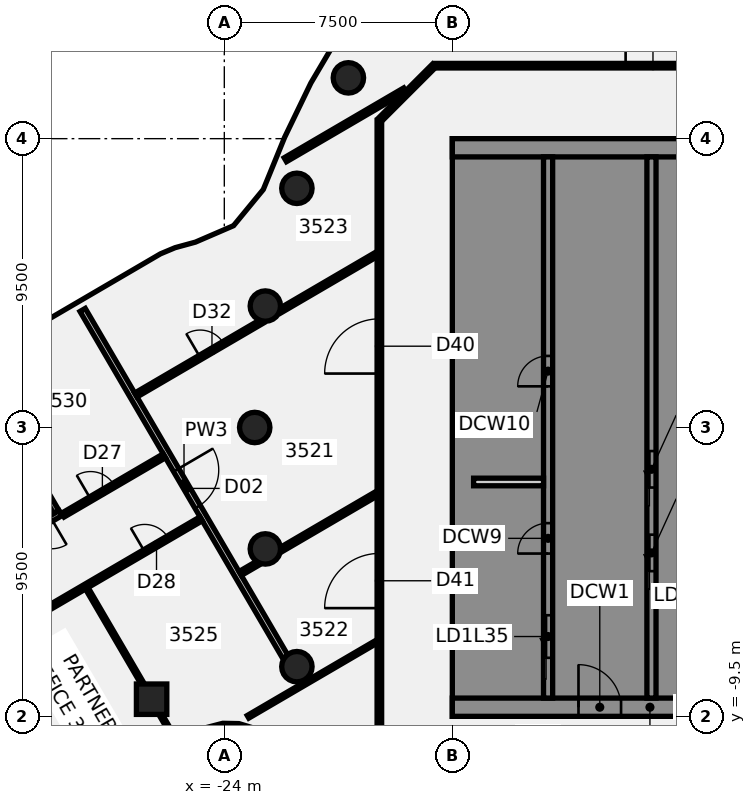
"""IFC4 building model, lengths in metres.
Left out: names, types, materials, properties, quantities, classifications, styles, units other than length and angle.
Written with IfcOpenShell. Run it as: python <this file> out.ifc"""

import sys

from ifc_helpers import new_model, si_unit, direction, frame, frame_2d, origin, origin_2d, place, context, subcontext, project, spatial, polyline, rectangle, circle, outline, extrude, element, fill, save


model = new_model("IFC4")
c1 = context("Model", 3, precision=1e-05, world=origin(), true_north=direction((0.0, 1.0)))
c2 = subcontext(c1, "Body", "Model", "MODEL_VIEW")
j1 = project(units=[si_unit("LENGTHUNIT", "METRE"), si_unit("PLANEANGLEUNIT", "RADIAN")], contexts=[c1])
p1 = place(None, origin())
s1 = spatial("IfcSite", under=j1, at=p1, CompositionType="ELEMENT")
p2 = place(p1, origin())
s2 = spatial("IfcBuilding", under=s1, at=p2, CompositionType="ELEMENT")
p3 = place(p2, frame((0.0, 0.0, 144.25)))
s3 = spatial("IfcBuildingStorey", under=s2, at=p3, CompositionType="ELEMENT", Elevation=144.25)
for number, where, z_axis, x_axis in (
    (1, (-19.919, 11.5, -0.14), (0.0, 0.0, 1.0), (1.0, 0.0, 0.0)),
    (2, (-21.613, 7.866, -0.14), (0.0, 0.0, 1.0), (1.0, 0.0, 0.0)),
    (3, (-22.651, 3.994, -0.14), (0.0, 0.0, 1.0), (1.0, 0.0, 0.0)),
    (4, (-23.0, 0.0, -0.14), (0.0, 0.0, 1.0), (1.0, 0.0, 0.0)),
    (5, (-22.651, -3.994, -0.14), (0.0, 0.0, 1.0), (1.0, 0.0, 0.0)),
    (6, (-21.613, -7.866, -0.14), (0.0, 0.0, 1.0), (1.0, 0.0, 0.0)),
):
    element("IfcColumn", number, at=place(p3, frame(where, z_axis=z_axis, x_axis=x_axis)), inside=s3, PredefinedType="COLUMN", context=c2, shape_type="SweptSolid", body=[
        extrude(circle(Radius=0.5, at=origin_2d()), origin(), (0.0, 0.0, 1.0), 3.75),
    ])
p4 = place(p3, frame((-26.391, -8.936, -0.139), z_axis=(0.043600009334, -0.020888959696, 0.998830661598), x_axis=(-0.504374638489, 0.862555380263, 0.04005546191)))
e7 = element("IfcColumn", 7, at=p4, inside=s3, PredefinedType="COLUMN", context=c2, shape_type="SweptSolid", body=[
    extrude(rectangle(XDim=1.0, YDim=1.0, at=origin_2d()), origin(), (0.0, 0.0, 1.0), 3.752),
])
p5 = place(p3, frame((-32.408, -7.559, 0.0), z_axis=(0.0, 0.0, 1.0), x_axis=(0.504461342909, -0.863434278628, 0.0)))
e8 = element("IfcWall", 8, at=p5, inside=s3, PredefinedType="PARTITIONING", context=c2, shape_type="SweptSolid", body=[
    extrude(rectangle(XDim=5.45, YDim=0.1, at=frame_2d((2.725, 0.0))), origin(), (0.0, 0.0, 1.0), 3.01),
])
p6 = place(p3, frame((-28.66, 3.867, 0.0), z_axis=(0.0, 0.0, 1.0), x_axis=(0.504524218803, -0.863397540326, 0.0)))
e9 = element("IfcWall", 9, at=p6, inside=s3, PredefinedType="PARTITIONING", context=c2, shape_type="SweptSolid", body=[
    extrude(rectangle(XDim=13.22, YDim=0.2, at=frame_2d((6.61, 0.0))), origin(), (0.0, 0.0, 1.0), 3.01),
])
p7 = place(p6, frame((6.099, 0.0, 0.0)))
e10 = element("IfcOpeningElement", 10, at=p7, cuts=e9, PredefinedType="OPENING", context=c2, shape_type="SweptSolid", body=[
    extrude(rectangle(XDim=1.4, YDim=2.1, at=frame_2d((0.7, 1.05))), frame((0.0, 0.11, 0.0), z_axis=(0.0, -1.0, 0.0), x_axis=(1.0, 0.0, 0.0)), (0.0, 0.0, 1.0), 0.22),
])
p8 = place(p3, frame((-28.523, -5.289, 0.0), z_axis=(0.0, 0.0, 1.0), x_axis=(0.504526546489, -0.863396180144, 0.0)))
e11 = element("IfcWall", 11, at=p8, inside=s3, PredefinedType="PARTITIONING", context=c2, shape_type="SweptSolid", body=[
    extrude(rectangle(XDim=3.704, YDim=0.1, at=frame_2d((1.852, 0.0))), origin(), (0.0, 0.0, 1.0), 3.01),
])
p9 = place(p3, frame((-26.053, -9.517, 0.0), z_axis=(0.0, 0.0, 1.0), x_axis=(0.504517667242, -0.863401368682, 0.0)))
e12 = element("IfcWall", 12, at=p9, inside=s3, PredefinedType="PARTITIONING", context=c2, shape_type="SweptSolid", body=[
    extrude(rectangle(XDim=0.563, YDim=0.1, at=frame_2d((0.282, 0.0))), origin(), (0.0, 0.0, 1.0), 3.01),
])
p10 = place(p3, frame((-9.516, 23.22, 0.0), z_axis=(0.0, 0.0, 1.0), x_axis=(0.504508390898, -0.863406789128, 0.0)))
e13 = element("IfcWall", 13, at=p10, inside=s3, PredefinedType="PARTITIONING", context=c2, shape_type="SweptSolid", body=[
    extrude(rectangle(XDim=13.001, YDim=0.15, at=frame_2d((6.5, 0.0))), origin(), (0.0, 0.0, 1.0), 3.01),
])
p11 = place(p3, frame((-17.065, 11.9, 0.0), z_axis=(0.0, 0.0, 1.0), x_axis=(1.0, 0.0, 0.0)))
e14 = element("IfcWall", 14, at=p11, inside=s3, PredefinedType="PARTITIONING", context=c2, shape_type="SweptSolid", body=[
    extrude(rectangle(XDim=34.165, YDim=0.15, at=frame_2d((17.083, 0.0))), origin(), (0.0, 0.0, 1.0), 3.01),
])
p12 = place(p11, frame((22.029, 0.0, 0.0)))
e15 = element("IfcOpeningElement", 15, at=p12, cuts=e14, PredefinedType="OPENING", context=c2, shape_type="SweptSolid", body=[
    extrude(rectangle(XDim=1.8, YDim=2.1, at=frame_2d((0.9, 1.05))), frame((0.0, 0.085, 0.0), z_axis=(0.0, -1.0, 0.0), x_axis=(1.0, 0.0, 0.0)), (0.0, 0.0, 1.0), 0.17),
])
p13 = place(p11, frame((29.48, 0.0, 0.0)))
e16 = element("IfcOpeningElement", 16, at=p13, cuts=e14, PredefinedType="OPENING", context=c2, shape_type="SweptSolid", body=[
    extrude(rectangle(XDim=1.8, YDim=2.1, at=frame_2d((0.9, 1.05))), frame((0.0, 0.085, 0.0), z_axis=(0.0, -1.0, 0.0), x_axis=(1.0, 0.0, 0.0)), (0.0, 0.0, 1.0), 0.17),
])
p14 = place(p11, frame((6.265, 0.0, 0.0)))
e17 = element("IfcOpeningElement", 17, at=p14, cuts=e14, PredefinedType="OPENING", context=c2, shape_type="SweptSolid", body=[
    extrude(rectangle(XDim=1.8, YDim=2.1, at=frame_2d((0.9, 1.05))), frame((0.0, 0.085, 0.0), z_axis=(0.0, -1.0, 0.0), x_axis=(1.0, 0.0, 0.0)), (0.0, 0.0, 1.0), 0.17),
])
p15 = place(p3, frame((-29.306, -2.879, 0.0), z_axis=(0.0, 0.0, 1.0), x_axis=(0.863400207062, 0.504519655163, 0.0)))
e18 = element("IfcWall", 18, at=p15, inside=s3, PredefinedType="PARTITIONING", context=c2, shape_type="SweptSolid", body=[
    extrude(rectangle(XDim=3.861, YDim=0.15, at=frame_2d((1.93, 0.0))), origin(), (0.0, 0.0, 1.0), 3.01),
])
p16 = place(p15, frame((1.05, 0.0, 0.0)))
e19 = element("IfcOpeningElement", 19, at=p16, cuts=e18, PredefinedType="OPENING", context=c2, shape_type="SweptSolid", body=[
    extrude(rectangle(XDim=0.9, YDim=2.1, at=frame_2d((0.45, 1.05))), frame((0.0, 0.085, 0.0), z_axis=(0.0, -1.0, 0.0), x_axis=(1.0, 0.0, 0.0)), (0.0, 0.0, 1.0), 0.17),
])
p17 = place(p3, frame((-40.148, -11.995, 0.0), z_axis=(0.0, 0.0, 1.0), x_axis=(0.863379617507, 0.504554889058, 0.0)))
e20 = element("IfcWall", 20, at=p17, inside=s3, PredefinedType="PARTITIONING", context=c2, shape_type="SweptSolid", body=[
    extrude(rectangle(XDim=17.82, YDim=0.15, at=frame_2d((8.91, 0.0))), origin(), (0.0, 0.0, 1.0), 3.01),
])
p18 = place(p17, frame((15.67, 0.0, 0.0)))
e21 = element("IfcOpeningElement", 21, at=p18, cuts=e20, PredefinedType="OPENING", context=c2, shape_type="SweptSolid", body=[
    extrude(rectangle(XDim=0.9, YDim=2.1, at=frame_2d((0.45, 1.05))), frame((0.0, 0.085, 0.0), z_axis=(0.0, -1.0, 0.0), x_axis=(1.0, 0.0, 0.0)), (0.0, 0.0, 1.0), 0.17),
])
p19 = place(p17, frame((10.121, 0.0, 0.0)))
e22 = element("IfcOpeningElement", 22, at=p19, cuts=e20, PredefinedType="OPENING", context=c2, shape_type="SweptSolid", body=[
    extrude(rectangle(XDim=0.9, YDim=2.1, at=frame_2d((0.45, 1.05))), frame((0.0, 0.085, 0.0), z_axis=(0.0, -1.0, 0.0), x_axis=(1.0, 0.0, 0.0)), (0.0, 0.0, 1.0), 0.17),
])
p20 = place(p17, frame((6.821, 0.0, 0.0)))
e23 = element("IfcOpeningElement", 23, at=p20, cuts=e20, PredefinedType="OPENING", context=c2, shape_type="SweptSolid", body=[
    extrude(rectangle(XDim=0.9, YDim=2.1, at=frame_2d((0.45, 1.05))), frame((0.0, 0.085, 0.0), z_axis=(0.0, -1.0, 0.0), x_axis=(1.0, 0.0, 0.0)), (0.0, 0.0, 1.0), 0.17),
])
p21 = place(p17, frame((1.27, 0.0, 0.0)))
e24 = element("IfcOpeningElement", 24, at=p21, cuts=e20, PredefinedType="OPENING", context=c2, shape_type="SweptSolid", body=[
    extrude(rectangle(XDim=0.9, YDim=2.1, at=frame_2d((0.45, 1.05))), frame((0.0, 0.085, 0.0), z_axis=(0.0, -1.0, 0.0), x_axis=(1.0, 0.0, 0.0)), (0.0, 0.0, 1.0), 0.17),
])
p22 = place(p3, frame((-26.91, 1.069, 0.0), z_axis=(0.0, 0.0, 1.0), x_axis=(0.863390233873, 0.504536722205, 0.0)))
e25 = element("IfcWall", 25, at=p22, inside=s3, PredefinedType="PARTITIONING", context=c2, shape_type="SweptSolid", body=[
    extrude(rectangle(XDim=4.833, YDim=0.15, at=frame_2d((2.417, 0.0))), origin(), (0.0, 0.0, 1.0), 3.01),
])
p23 = place(p22, frame((2.45, 0.0, 0.0)))
e26 = element("IfcOpeningElement", 26, at=p23, cuts=e25, PredefinedType="OPENING", context=c2, shape_type="SweptSolid", body=[
    extrude(rectangle(XDim=0.9, YDim=2.1, at=frame_2d((0.45, 1.05))), frame((0.0, 0.085, 0.0), z_axis=(0.0, -1.0, 0.0), x_axis=(1.0, 0.0, 0.0)), (0.0, 0.0, 1.0), 0.17),
])
p24 = place(p3, frame((-22.185, 3.83, 0.0), z_axis=(0.0, 0.0, 1.0), x_axis=(0.863366335697, 0.504577615818, 0.0)))
e27 = element("IfcWall", 27, at=p24, inside=s3, PredefinedType="PARTITIONING", context=c2, shape_type="SweptSolid", body=[
    extrude(rectangle(XDim=3.694, YDim=0.15, at=frame_2d((1.847, 0.0))), origin(), (0.0, 0.0, 1.0), 3.01),
])
p25 = place(p3, frame((-23.475, -4.8, 0.0), z_axis=(0.0, 0.0, 1.0), x_axis=(0.863413221126, 0.504497383129, 0.0)))
e28 = element("IfcWall", 28, at=p25, inside=s3, PredefinedType="PARTITIONING", context=c2, shape_type="SweptSolid", body=[
    extrude(rectangle(XDim=0.703, YDim=0.15, at=frame_2d((0.351, 0.0))), origin(), (0.0, 0.0, 1.0), 3.01),
])
p26 = place(p3, frame((-22.149, -4.025, 0.0), z_axis=(0.0, 0.0, 1.0), x_axis=(0.863310681939, 0.5046728311, 0.0)))
e29 = element("IfcWall", 29, at=p26, inside=s3, PredefinedType="PARTITIONING", context=c2, shape_type="SweptSolid", body=[
    extrude(rectangle(XDim=3.653, YDim=0.15, at=frame_2d((1.826, 0.0))), origin(), (0.0, 0.0, 1.0), 3.01),
])
p27 = place(p3, frame((-23.22, -9.516, 0.0), z_axis=(0.0, 0.0, 1.0), x_axis=(0.863381791964, 0.504551168173, 0.0)))
e30 = element("IfcWall", 30, at=p27, inside=s3, PredefinedType="PARTITIONING", context=c2, shape_type="SweptSolid", body=[
    extrude(rectangle(XDim=4.909, YDim=0.1, at=frame_2d((2.455, 0.0))), origin(), (0.0, 0.0, 1.0), 3.01),
])
p28 = place(p3, frame((-21.993, 8.807, 0.0), z_axis=(0.0, 0.0, 1.0), x_axis=(0.863415016257, 0.504494310871, 0.0)))
e31 = element("IfcWall", 31, at=p28, inside=s3, PredefinedType="PARTITIONING", context=c2, shape_type="SweptSolid", body=[
    extrude(rectangle(XDim=4.553, YDim=0.15, at=frame_2d((2.277, 0.0))), origin(), (0.0, 0.0, 1.0), 3.01),
])
p29 = place(p3, frame((-18.872, 10.128, 0.0), z_axis=(0.0, 0.0, 1.0), x_axis=(0.707106781187, 0.707106781187, 0.0)))
e32 = element("IfcWall", 32, at=p29, inside=s3, PredefinedType="PARTITIONING", context=c2, shape_type="SweptSolid", body=[
    extrude(rectangle(XDim=2.505, YDim=0.15, at=frame_2d((1.253, 0.0))), origin(), (0.0, 0.0, 1.0), 3.01),
])
p30 = place(p3, frame((-18.9, -10.1, 0.0), z_axis=(0.0, 0.0, 1.0), x_axis=(0.0, 1.0, 0.0)))
e33 = element("IfcWall", 33, at=p30, inside=s3, PredefinedType="PARTITIONING", context=c2, shape_type="SweptSolid", body=[
    extrude(rectangle(XDim=20.2, YDim=0.15, at=frame_2d((10.1, 0.0))), origin(), (0.0, 0.0, 1.0), 3.01),
])
p31 = place(p30, frame((11.874, 0.0, 0.0)))
e34 = element("IfcOpeningElement", 34, at=p31, cuts=e33, PredefinedType="OPENING", context=c2, shape_type="SweptSolid", body=[
    extrude(rectangle(XDim=1.8, YDim=2.1, at=frame_2d((0.9, 1.05))), frame((0.0, 0.085, 0.0), z_axis=(0.0, -1.0, 0.0), x_axis=(1.0, 0.0, 0.0)), (0.0, 0.0, 1.0), 0.17),
])
p32 = place(p30, frame((4.159, 0.0, 0.0)))
e35 = element("IfcOpeningElement", 35, at=p32, cuts=e33, PredefinedType="OPENING", context=c2, shape_type="SweptSolid", body=[
    extrude(rectangle(XDim=1.8, YDim=2.1, at=frame_2d((0.9, 1.05))), frame((0.0, 0.085, 0.0), z_axis=(0.0, -1.0, 0.0), x_axis=(1.0, 0.0, 0.0)), (0.0, 0.0, 1.0), 0.17),
])
p33 = place(p3, frame((-16.5, -9.2, 0.0), z_axis=(0.0, 0.0, 1.0), x_axis=(1.0, 0.0, 0.0)))
e36 = element("IfcWall", 36, at=p33, inside=s3, PredefinedType="SHEAR", context=c2, shape_type="SweptSolid", body=[
    extrude(rectangle(XDim=13.0, YDim=0.6, at=frame_2d((6.5, 0.0))), origin(), (0.0, 0.0, 1.0), 3.61),
])
p34 = place(p33, frame((4.15, 0.0, 0.0)))
e37 = element("IfcOpeningElement", 37, at=p34, cuts=e36, PredefinedType="OPENING", context=c2, shape_type="SweptSolid", body=[
    extrude(rectangle(XDim=1.4, YDim=2.1, at=frame_2d((0.7, 1.05))), frame((0.0, 0.31, 0.0), z_axis=(0.0, -1.0, 0.0), x_axis=(1.0, 0.0, 0.0)), (0.0, 0.0, 1.0), 0.62),
])
p35 = place(p33, frame((10.125, 0.0, 0.0)))
e38 = element("IfcOpeningElement", 38, at=p35, cuts=e36, PredefinedType="OPENING", context=c2, shape_type="SweptSolid", body=[
    extrude(rectangle(XDim=1.4, YDim=2.1, at=frame_2d((0.7, 1.05))), frame((0.0, 0.31, 0.0), z_axis=(0.0, -1.0, 0.0), x_axis=(1.0, 0.0, 0.0)), (0.0, 0.0, 1.0), 0.62),
])
p36 = place(p3, origin())
e39 = element("IfcWall", 39, at=p36, inside=s3, PredefinedType="SHEAR", context=c2, shape_type="SweptSolid", body=[
    extrude(outline(polyline([(-13.5, -8.125), (-15.9, -8.125), (-15.9, -5.625), (-13.5, -5.625), (-13.5, -5.375), (-15.9, -5.375), (-15.9, 5.375), (-13.5, 5.375), (-13.5, 5.625), (-15.9, 5.625), (-15.9, 8.125), (-13.5, 8.125), (-13.5, 8.9), (-15.9, 8.9), (-16.5, 8.9), (-16.5, -8.9), (-15.9, -8.9), (-13.5, -8.9), (-13.5, -8.125)])), origin(), (0.0, 0.0, 1.0), 3.61),
])
p37 = place(p3, frame((-16.5, 9.2, 0.0), z_axis=(0.0, 0.0, 1.0), x_axis=(1.0, 0.0, 0.0)))
e40 = element("IfcWall", 40, at=p37, inside=s3, PredefinedType="SHEAR", context=c2, shape_type="SweptSolid", body=[
    extrude(rectangle(XDim=13.0, YDim=0.6, at=frame_2d((6.5, 0.0))), origin(), (0.0, 0.0, 1.0), 3.61),
])
p38 = place(p3, origin())
e41 = element("IfcWall", 41, at=p38, inside=s3, PredefinedType="SHEAR", context=c2, shape_type="SweptSolid", body=[
    extrude(outline(polyline([(-9.8, -5.375), (-9.8, -5.625), (-7.5, -5.625), (-7.2, -5.625), (-7.2, 8.9), (-7.5, 8.9), (-9.8, 8.9), (-9.8, 8.125), (-7.5, 8.125), (-7.5, 5.625), (-9.8, 5.625), (-9.8, 5.375), (-7.5, 5.375), (-7.5, 2.875), (-9.8, 2.875), (-9.8, 2.625), (-7.5, 2.625), (-7.5, 0.125), (-9.8, 0.125), (-9.8, -0.125), (-7.5, -0.125), (-7.5, -2.625), (-9.8, -2.625), (-9.8, -2.875), (-7.5, -2.875), (-7.5, -5.375), (-9.8, -5.375)])), origin(), (0.0, 0.0, 1.0), 3.61),
])
p39 = place(p3, origin())
e42 = element("IfcWall", 42, at=p39, inside=s3, PredefinedType="SHEAR", context=c2, shape_type="SweptSolid", body=[
    extrude(outline(polyline([(-7.5, -8.125), (-9.55, -8.125), (-9.55, -5.625), (-9.8, -5.625), (-9.8, -8.125), (-9.8, -8.9), (-7.5, -8.9), (-7.5, -8.125)])), origin(), (0.0, 0.0, 1.0), 3.61),
])
p40 = place(p3, frame((-13.35, -8.9, 0.0), z_axis=(0.0, 0.0, 1.0), x_axis=(0.0, 1.0, 0.0)))
e43 = element("IfcWall", 43, at=p40, inside=s3, PredefinedType="SHEAR", context=c2, shape_type="SweptSolid", body=[
    extrude(rectangle(XDim=17.8, YDim=0.3, at=frame_2d((8.9, 0.0))), origin(), (0.0, 0.0, 1.0), 3.61),
])
p41 = place(p40, frame((1.325, 0.0, 0.0)))
e44 = element("IfcOpeningElement", 44, at=p41, cuts=e43, PredefinedType="OPENING", context=c2, shape_type="SweptSolid", body=[
    extrude(rectangle(XDim=1.4, YDim=2.1, at=frame_2d((0.7, 1.05))), frame((0.0, 0.16, 0.0), z_axis=(0.0, -1.0, 0.0), x_axis=(1.0, 0.0, 0.0)), (0.0, 0.0, 1.0), 0.32),
])
p42 = place(p40, frame((4.754, 0.0, 0.0)))
e45 = element("IfcOpeningElement", 45, at=p42, cuts=e43, PredefinedType="OPENING", context=c2, shape_type="SweptSolid", body=[
    extrude(rectangle(XDim=1.0, YDim=2.1, at=frame_2d((0.5, 1.05))), frame((0.0, 0.16, 0.0), z_axis=(0.0, -1.0, 0.0), x_axis=(1.0, 0.0, 0.0)), (0.0, 0.0, 1.0), 0.32),
])
p43 = place(p40, frame((10.254, 0.0, 0.0)))
e46 = element("IfcOpeningElement", 46, at=p43, cuts=e43, PredefinedType="OPENING", context=c2, shape_type="SweptSolid", body=[
    extrude(rectangle(XDim=1.0, YDim=2.1, at=frame_2d((0.5, 1.05))), frame((0.0, 0.16, 0.0), z_axis=(0.0, -1.0, 0.0), x_axis=(1.0, 0.0, 0.0)), (0.0, 0.0, 1.0), 0.32),
])
p44 = place(p3, frame((-9.95, -8.9, 0.0), z_axis=(0.0, 0.0, 1.0), x_axis=(0.0, 1.0, 0.0)))
e47 = element("IfcWall", 47, at=p44, inside=s3, PredefinedType="SHEAR", context=c2, shape_type="SweptSolid", body=[
    extrude(rectangle(XDim=17.8, YDim=0.3, at=frame_2d((8.9, 0.0))), origin(), (0.0, 0.0, 1.0), 3.61),
])
p45 = place(p44, frame((4.175, 0.0, 0.0)))
e48 = element("IfcOpeningElement", 48, at=p45, cuts=e47, PredefinedType="OPENING", context=c2, shape_type="SweptSolid", body=[
    extrude(rectangle(XDim=1.2, YDim=2.1, at=frame_2d((0.6, 1.05))), frame((0.0, 0.16, 0.0), z_axis=(0.0, -1.0, 0.0), x_axis=(1.0, 0.0, 0.0)), (0.0, 0.0, 1.0), 0.32),
])
p46 = place(p44, frame((6.925, 0.0, 0.0)))
e49 = element("IfcOpeningElement", 49, at=p46, cuts=e47, PredefinedType="OPENING", context=c2, shape_type="SweptSolid", body=[
    extrude(rectangle(XDim=1.2, YDim=2.1, at=frame_2d((0.6, 1.05))), frame((0.0, 0.16, 0.0), z_axis=(0.0, -1.0, 0.0), x_axis=(1.0, 0.0, 0.0)), (0.0, 0.0, 1.0), 0.32),
])
p47 = place(p3, frame((-15.8, -1.792, 0.0), z_axis=(0.0, 0.0, 1.0), x_axis=(1.0, 0.0, 0.0)))
e50 = element("IfcWall", 50, at=p47, inside=s3, PredefinedType="PARTITIONING", context=c2, shape_type="SweptSolid", body=[
    extrude(rectangle(XDim=2.3, YDim=0.25, at=frame_2d((1.15, 0.0))), origin(), (0.0, 0.0, 1.0), 3.61),
])
p48 = place(p3, frame((-29.39, -2.813, -0.14), z_axis=(0.0, 0.0, 1.0), x_axis=(-0.863399360713, -0.504521103542, 0.0)))
e51 = element("IfcWall", 51, at=p48, inside=s3, PredefinedType="SHEAR", context=c2, shape_type="SweptSolid", body=[
    extrude(rectangle(XDim=6.7, YDim=0.2, at=frame_2d((3.35, 0.0))), origin(), (0.0, 0.0, 1.0), 3.15),
])
p49 = place(p48, frame((0.35, 0.0, 0.0)))
e52 = element("IfcOpeningElement", 52, at=p49, cuts=e51, PredefinedType="OPENING", context=c2, shape_type="SweptSolid", body=[
    extrude(rectangle(XDim=1.0, YDim=2.1, at=frame_2d((0.5, 1.05))), frame((0.0, 0.11, 0.0), z_axis=(0.0, -1.0, 0.0), x_axis=(1.0, 0.0, 0.0)), (0.0, 0.0, 1.0), 0.22),
])
p50 = place(p3, frame((-31.142, -0.014, -0.14), z_axis=(0.0, 0.0, 1.0), x_axis=(0.504520750713, -0.863399566887, 0.0)))
e53 = element("IfcWall", 53, at=p50, inside=s3, PredefinedType="SHEAR", context=c2, shape_type="SweptSolid", body=[
    extrude(rectangle(XDim=3.2, YDim=0.2, at=frame_2d((1.6, 0.0))), origin(), (0.0, 0.0, 1.0), 3.15),
])
p51 = place(p7, origin())
e54 = element("IfcDoor", 54, at=p51, inside=s3, OperationType="DOUBLE_DOOR_SINGLE_SWING", PredefinedType="DOOR", context=c2, shape_type="SweptSolid", body=[
    extrude(rectangle(XDim=1.4, YDim=2.1, at=frame_2d((0.7, 1.05))), frame((0.0, 0.025, 0.0), z_axis=(0.0, -1.0, 0.0), x_axis=(1.0, 0.0, 0.0)), (0.0, 0.0, 1.0), 0.05),
])
fill(e10, e54)
p52 = place(p14, origin())
e55 = element("IfcDoor", 55, at=p52, inside=s3, OperationType="DOUBLE_DOOR_SINGLE_SWING", PredefinedType="DOOR", context=c2, shape_type="SweptSolid", body=[
    extrude(rectangle(XDim=1.8, YDim=2.1, at=frame_2d((0.9, 1.05))), frame((0.0, 0.025, 0.0), z_axis=(0.0, -1.0, 0.0), x_axis=(1.0, 0.0, 0.0)), (0.0, 0.0, 1.0), 0.05),
])
fill(e17, e55)
p53 = place(p16, origin())
e56 = element("IfcDoor", 56, at=p53, inside=s3, OperationType="SINGLE_SWING_RIGHT", PredefinedType="DOOR", context=c2, shape_type="SweptSolid", body=[
    extrude(rectangle(XDim=0.9, YDim=2.1, at=frame_2d((0.45, 1.05))), frame((0.0, 0.025, 0.0), z_axis=(0.0, -1.0, 0.0), x_axis=(1.0, 0.0, 0.0)), (0.0, 0.0, 1.0), 0.05),
])
fill(e19, e56)
p54 = place(p18, frame((0.9, 0.0, 0.0), z_axis=(0.0, 0.0, 1.0), x_axis=(-1.0, 0.0, 0.0)))
e57 = element("IfcDoor", 57, at=p54, inside=s3, OperationType="SINGLE_SWING_RIGHT", PredefinedType="DOOR", context=c2, shape_type="SweptSolid", body=[
    extrude(rectangle(XDim=0.9, YDim=2.1, at=frame_2d((0.45, 1.05))), frame((0.0, 0.025, 0.0), z_axis=(0.0, -1.0, 0.0), x_axis=(1.0, 0.0, 0.0)), (0.0, 0.0, 1.0), 0.05),
])
fill(e21, e57)
p55 = place(p23, origin())
e58 = element("IfcDoor", 58, at=p55, inside=s3, OperationType="SINGLE_SWING_LEFT", PredefinedType="DOOR", context=c2, shape_type="SweptSolid", body=[
    extrude(rectangle(XDim=0.9, YDim=2.1, at=frame_2d((0.45, 1.05))), frame((0.0, 0.025, 0.0), z_axis=(0.0, -1.0, 0.0), x_axis=(1.0, 0.0, 0.0)), (0.0, 0.0, 1.0), 0.05),
])
fill(e26, e58)
p56 = place(p31, frame((1.8, 0.0, 0.0), z_axis=(0.0, 0.0, 1.0), x_axis=(-1.0, 0.0, 0.0)))
e59 = element("IfcDoor", 59, at=p56, inside=s3, OperationType="DOUBLE_DOOR_SINGLE_SWING", PredefinedType="DOOR", context=c2, shape_type="SweptSolid", body=[
    extrude(rectangle(XDim=1.8, YDim=2.1, at=frame_2d((0.9, 1.05))), frame((0.0, 0.025, 0.0), z_axis=(0.0, -1.0, 0.0), x_axis=(1.0, 0.0, 0.0)), (0.0, 0.0, 1.0), 0.05),
])
fill(e34, e59)
p57 = place(p32, origin())
e60 = element("IfcDoor", 60, at=p57, inside=s3, OperationType="DOUBLE_DOOR_SINGLE_SWING", PredefinedType="DOOR", context=c2, shape_type="SweptSolid", body=[
    extrude(rectangle(XDim=1.8, YDim=2.1, at=frame_2d((0.9, 1.05))), frame((0.0, 0.025, 0.0), z_axis=(0.0, -1.0, 0.0), x_axis=(1.0, 0.0, 0.0)), (0.0, 0.0, 1.0), 0.05),
])
fill(e35, e60)
p58 = place(p34, origin())
e61 = element("IfcDoor", 61, at=p58, inside=s3, OperationType="SINGLE_SWING_LEFT", PredefinedType="DOOR", context=c2, shape_type="SweptSolid", body=[
    extrude(rectangle(XDim=1.4, YDim=2.1, at=frame_2d((0.7, 1.05))), frame((0.0, 0.025, 0.0), z_axis=(0.0, -1.0, 0.0), x_axis=(1.0, 0.0, 0.0)), (0.0, 0.0, 1.0), 0.05),
])
fill(e37, e61)
p59 = place(p41, origin())
e62 = element("IfcDoor", 62, at=p59, inside=s3, OperationType="SLIDING_TO_LEFT", PredefinedType="DOOR", context=c2, shape_type="SweptSolid", body=[
    extrude(rectangle(XDim=1.4, YDim=2.1, at=frame_2d((0.7, 1.05))), frame((0.0, 0.025, 0.0), z_axis=(0.0, -1.0, 0.0), x_axis=(1.0, 0.0, 0.0)), (0.0, 0.0, 1.0), 0.05),
])
fill(e44, e62)
p60 = place(p45, origin())
e63 = element("IfcDoor", 63, at=p60, inside=s3, OperationType="SLIDING_TO_LEFT", PredefinedType="DOOR", context=c2, shape_type="SweptSolid", body=[
    extrude(rectangle(XDim=1.2, YDim=2.1, at=frame_2d((0.6, 1.05))), frame((0.0, 0.025, 0.0), z_axis=(0.0, -1.0, 0.0), x_axis=(1.0, 0.0, 0.0)), (0.0, 0.0, 1.0), 0.05),
])
fill(e48, e63)
p61 = place(p46, origin())
e64 = element("IfcDoor", 64, at=p61, inside=s3, OperationType="SLIDING_TO_LEFT", PredefinedType="DOOR", context=c2, shape_type="SweptSolid", body=[
    extrude(rectangle(XDim=1.2, YDim=2.1, at=frame_2d((0.6, 1.05))), frame((0.0, 0.025, 0.0), z_axis=(0.0, -1.0, 0.0), x_axis=(1.0, 0.0, 0.0)), (0.0, 0.0, 1.0), 0.05),
])
fill(e49, e64)
p62 = place(p42, origin())
e65 = element("IfcDoor", 65, at=p62, inside=s3, OperationType="SINGLE_SWING_LEFT", PredefinedType="DOOR", context=c2, shape_type="SweptSolid", body=[
    extrude(rectangle(XDim=1.0, YDim=2.1, at=frame_2d((0.5, 1.05))), frame((0.0, 0.025, 0.0), z_axis=(0.0, -1.0, 0.0), x_axis=(1.0, 0.0, 0.0)), (0.0, 0.0, 1.0), 0.05),
])
fill(e45, e65)
p63 = place(p43, origin())
e66 = element("IfcDoor", 66, at=p63, inside=s3, OperationType="SINGLE_SWING_LEFT", PredefinedType="DOOR", context=c2, shape_type="SweptSolid", body=[
    extrude(rectangle(XDim=1.0, YDim=2.1, at=frame_2d((0.5, 1.05))), frame((0.0, 0.025, 0.0), z_axis=(0.0, -1.0, 0.0), x_axis=(1.0, 0.0, 0.0)), (0.0, 0.0, 1.0), 0.05),
])
fill(e46, e66)
save(model, sys.argv[1])
